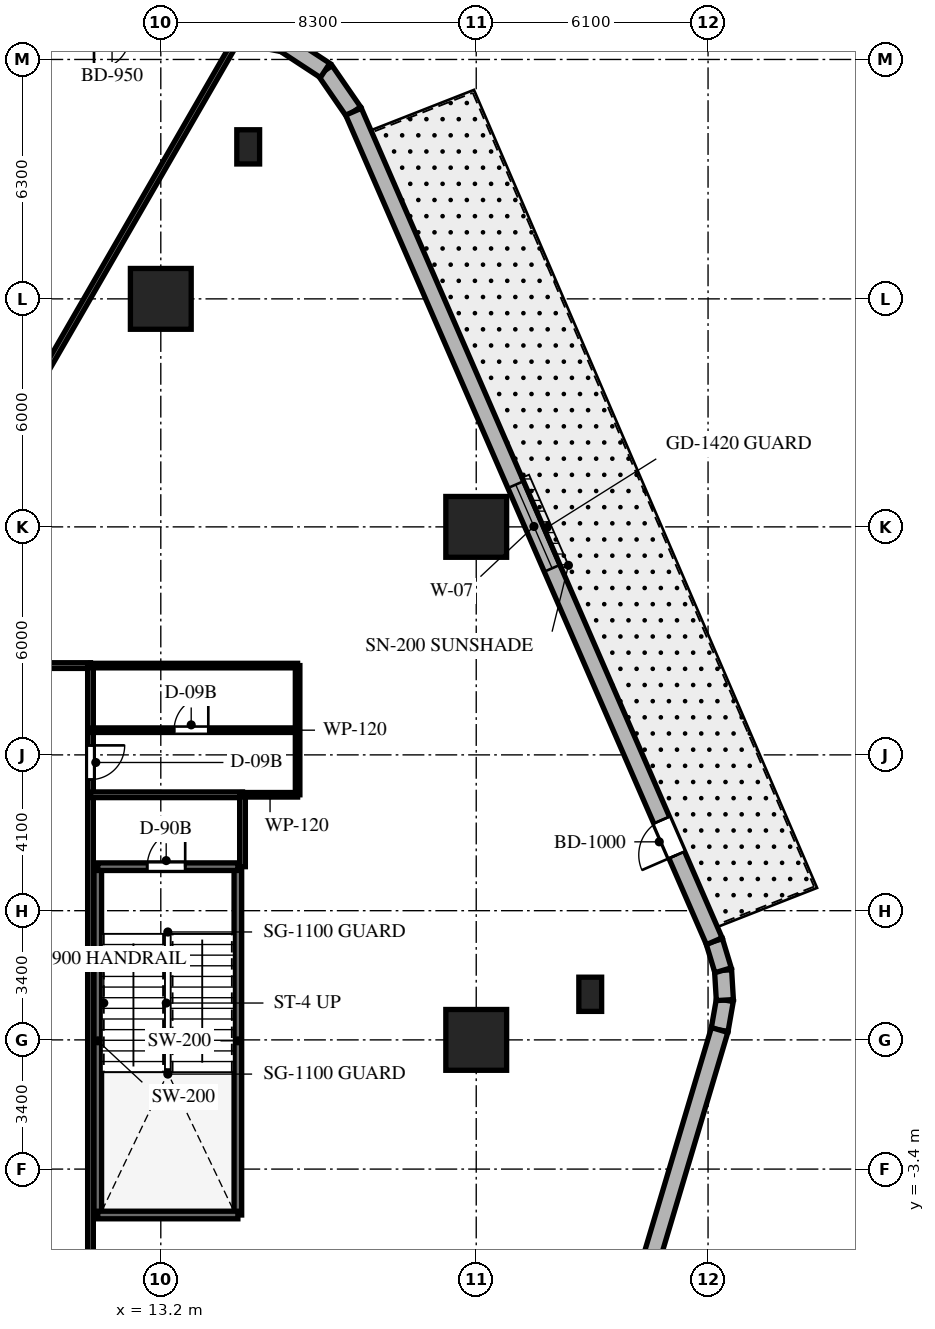
"""IFC4 building model, lengths in metres.
Left out: names, types, materials, properties, quantities, classifications, styles, units other than length and angle.
Written with IfcOpenShell. Run it as: python <this file> out.ifc"""

import sys

from ifc_helpers import new_model, si_unit, direction, frame, frame_2d, origin, origin_2d, place, context, subcontext, project, spatial, rectangle, extrude, element, fill, save


model = new_model("IFC4")
c1 = context("Model", 3, precision=1e-05, world=origin(), true_north=direction((0.0, 1.0)))
c2 = subcontext(c1, "Body", "Model", "MODEL_VIEW")
j1 = project(units=[si_unit("LENGTHUNIT", "METRE"), si_unit("PLANEANGLEUNIT", "RADIAN")], contexts=[c1])
p1 = place(None, origin())
s1 = spatial("IfcSite", under=j1, at=p1, CompositionType="ELEMENT")
p2 = place(p1, origin())
s2 = spatial("IfcBuilding", under=s1, at=p2, CompositionType="ELEMENT")
p3 = place(p2, frame((0.0, 0.0, 18.6)))
s3 = spatial("IfcBuildingStorey", under=s2, at=p3, CompositionType="ELEMENT", Elevation=18.6)
for number, where, z_axis, x_axis in (
    (1, (11.542, -4.608, 0.0), (0.0, 0.0, 1.0), (0.0, 1.0, 0.0)),
    (2, (15.228, -4.608, 0.0), (0.0, 0.0, 1.0), (0.0, 1.0, 0.0)),
):
    element("IfcWall", number, at=place(p3, frame(where, z_axis=z_axis, x_axis=x_axis)), inside=s3, PredefinedType="SHEAR", context=c2, shape_type="SweptSolid", body=[
        extrude(rectangle(XDim=9.166, YDim=0.2, at=frame_2d((4.583, 0.0))), origin(), (0.0, 0.0, 1.0), 4.8),
    ])
p4 = place(p3, frame((11.542, -4.608, 0.0), z_axis=(0.0, 0.0, 1.0), x_axis=(1.0, 0.0, 0.0)))
e3 = element("IfcWall", 3, at=p4, inside=s3, PredefinedType="SHEAR", context=c2, shape_type="SweptSolid", body=[
    extrude(rectangle(XDim=3.686, YDim=0.2, at=frame_2d((1.843, 0.0))), origin(), (0.0, 0.0, 1.0), 4.8),
])
p5 = place(p3, frame((11.542, 4.558, 0.0), z_axis=(0.0, 0.0, 1.0), x_axis=(1.0, 0.0, 0.0)))
e4 = element("IfcWall", 4, at=p5, inside=s3, PredefinedType="SHEAR", context=c2, shape_type="SweptSolid", body=[
    extrude(rectangle(XDim=3.686, YDim=0.2, at=frame_2d((1.843, 0.0))), origin(), (0.0, 0.0, 1.0), 4.8),
])
p6 = place(p5, frame((1.3, 0.0, 0.0)))
e5 = element("IfcOpeningElement", 5, at=p6, cuts=e4, PredefinedType="OPENING", context=c2, shape_type="SweptSolid", body=[
    extrude(rectangle(XDim=1.0, YDim=2.15, at=frame_2d((0.5, 1.075))), frame((0.0, 0.11, 0.0), z_axis=(0.0, -1.0, 0.0), x_axis=(1.0, 0.0, 0.0)), (0.0, 0.0, 1.0), 0.22),
])
for number, where, z_axis, x_axis in (
    (6, (21.5, 0.0, 0.0), (0.0, 0.0, 1.0), (1.0, 0.0, 0.0)),
    (7, (21.5, 13.5, 0.0), (0.0, 0.0, 1.0), (1.0, 0.0, 0.0)),
    (8, (13.2, 19.5, 0.0), (0.0, 0.0, 1.0), (1.0, 0.0, 0.0)),
):
    element("IfcColumn", number, at=place(p3, frame(where, z_axis=z_axis, x_axis=x_axis)), inside=s3, PredefinedType="COLUMN", context=c2, shape_type="SweptSolid", body=[
        extrude(rectangle(XDim=1.6, YDim=1.6, at=origin_2d()), origin(), (0.0, 0.0, 1.0), 4.8),
    ])
for number, where, z_axis, x_axis in (
    (9, (24.5, 1.2, 0.0), (0.0, 0.0, 1.0), (1.0, 0.0, 0.0)),
    (10, (15.5, 23.5, 0.0), (0.0, 0.0, 1.0), (1.0, 0.0, 0.0)),
):
    element("IfcColumn", number, at=place(p3, frame(where, z_axis=z_axis, x_axis=x_axis)), inside=s3, PredefinedType="PILASTER", context=c2, shape_type="SweptSolid", body=[
        extrude(rectangle(XDim=0.6, YDim=0.9, at=origin_2d()), origin(), (0.0, 0.0, 1.0), 4.8),
    ])
p7 = place(p3, frame((27.905, 0.26, 0.0), z_axis=(0.0, 0.0, 1.0), x_axis=(0.17266943956, 0.984979829561, 0.0)))
e11 = element("IfcWall", 11, at=p7, inside=s3, PredefinedType="SOLIDWALL", context=c2, shape_type="SweptSolid", body=[
    extrude(rectangle(XDim=0.799, YDim=0.45, at=frame_2d((0.399, 0.0))), origin(), (0.0, 0.0, 1.0), 4.48),
])
p8 = place(p3, frame((28.042, 1.047, 0.0), z_axis=(0.0, 0.0, 1.0), x_axis=(-0.059960394052, 0.998200756935, 0.0)))
e12 = element("IfcWall", 12, at=p8, inside=s3, PredefinedType="SOLIDWALL", context=c2, shape_type="SweptSolid", body=[
    extrude(rectangle(XDim=0.786, YDim=0.45, at=frame_2d((0.393, 0.0))), origin(), (0.0, 0.0, 1.0), 4.48),
])
p9 = place(p3, frame((27.995, 1.832, 0.0), z_axis=(0.0, 0.0, 1.0), x_axis=(-0.2894220622, 0.957201582694, 0.0)))
e13 = element("IfcWall", 13, at=p9, inside=s3, PredefinedType="SOLIDWALL", context=c2, shape_type="SweptSolid", body=[
    extrude(rectangle(XDim=0.799, YDim=0.45, at=frame_2d((0.399, 0.0))), origin(), (0.0, 0.0, 1.0), 4.48),
])
p10 = place(p3, frame((18.271, 24.426, 0.0), z_axis=(0.0, 0.0, 1.0), x_axis=(-0.567629051817, 0.823284434162, 0.0)))
e14 = element("IfcWall", 14, at=p10, inside=s3, PredefinedType="SOLIDWALL", context=c2, shape_type="SweptSolid", body=[
    extrude(rectangle(XDim=1.318, YDim=0.45, at=frame_2d((0.659, 0.0))), origin(), (0.0, 0.0, 1.0), 4.48),
])
p11 = place(p3, frame((17.523, 25.511, 0.0), z_axis=(0.0, 0.0, 1.0), x_axis=(-0.83622878949, 0.548380717776, 0.0)))
e15 = element("IfcWall", 15, at=p11, inside=s3, PredefinedType="SOLIDWALL", context=c2, shape_type="SweptSolid", body=[
    extrude(rectangle(XDim=1.296, YDim=0.45, at=frame_2d((0.648, 0.0))), origin(), (0.0, 0.0, 1.0), 4.48),
])
p12 = place(p3, frame((20.651, -24.042, 0.0), z_axis=(0.0, 0.0, 1.0), x_axis=(0.286003469805, 0.958228581947, 0.0)))
e16 = element("IfcWall", 16, at=p12, inside=s3, PredefinedType="SOLIDWALL", context=c2, shape_type="SweptSolid", body=[
    extrude(rectangle(XDim=25.362, YDim=0.45, at=frame_2d((12.681, 0.0))), origin(), (0.0, 0.0, 1.0), 4.48),
])
p13 = place(p12, frame((11.481, 0.0, 0.85)))
e17 = element("IfcOpeningElement", 17, at=p13, cuts=e16, PredefinedType="OPENING", context=c2, shape_type="SweptSolid", body=[
    extrude(rectangle(XDim=2.4, YDim=2.4, at=frame_2d((1.2, 1.2))), frame((0.0, 0.235, 0.0), z_axis=(0.0, -1.0, 0.0), x_axis=(1.0, 0.0, 0.0)), (0.0, 0.0, 1.0), 0.47),
])
p14 = place(p3, frame((27.764, 2.596, 0.0), z_axis=(0.0, 0.0, 1.0), x_axis=(-0.398798114842, 0.917038747054, 0.0)))
e18 = element("IfcWall", 18, at=p14, inside=s3, PredefinedType="SOLIDWALL", context=c2, shape_type="SweptSolid", body=[
    extrude(rectangle(XDim=23.804, YDim=0.45, at=frame_2d((11.902, 0.0))), origin(), (0.0, 0.0, 1.0), 4.48),
])
p15 = place(p14, frame((2.476, 0.0, 0.0)))
e19 = element("IfcOpeningElement", 19, at=p15, cuts=e18, PredefinedType="OPENING", context=c2, shape_type="SweptSolid", body=[
    extrude(rectangle(XDim=1.0, YDim=2.15, at=frame_2d((0.5, 1.075))), frame((0.0, 0.235, 0.0), z_axis=(0.0, -1.0, 0.0), x_axis=(1.0, 0.0, 0.0)), (0.0, 0.0, 1.0), 0.47),
])
p16 = place(p14, frame((10.702, 0.0, 0.85)))
e20 = element("IfcOpeningElement", 20, at=p16, cuts=e18, PredefinedType="OPENING", context=c2, shape_type="SweptSolid", body=[
    extrude(rectangle(XDim=2.4, YDim=2.4, at=frame_2d((1.2, 1.2))), frame((0.0, 0.235, 0.0), z_axis=(0.0, -1.0, 0.0), x_axis=(1.0, 0.0, 0.0)), (0.0, 0.0, 1.0), 0.47),
])
p17 = place(p3, frame((-11.35, 9.85, 0.0), z_axis=(0.0, 0.0, 1.0), x_axis=(1.0, 0.0, 0.0)))
e21 = element("IfcWall", 21, at=p17, inside=s3, PredefinedType="PARTITIONING", context=c2, shape_type="SweptSolid", body=[
    extrude(rectangle(XDim=22.7, YDim=0.15, at=frame_2d((11.35, 0.0))), origin(), (0.0, 0.0, 1.0), 3.522),
])
p18 = place(p17, frame((19.249, 0.0, 0.0)))
e22 = element("IfcOpeningElement", 22, at=p18, cuts=e21, PredefinedType="OPENING", context=c2, shape_type="SweptSolid", body=[
    extrude(rectangle(XDim=1.0, YDim=2.03, at=frame_2d((0.5, 1.015))), frame((0.0, 0.085, 0.0), z_axis=(0.0, -1.0, 0.0), x_axis=(1.0, 0.0, 0.0)), (0.0, 0.0, 1.0), 0.17),
])
p19 = place(p3, frame((11.35, 9.85, 0.0), z_axis=(0.0, 0.0, 1.0), x_axis=(0.0, -1.0, 0.0)))
e23 = element("IfcWall", 23, at=p19, inside=s3, PredefinedType="PARTITIONING", context=c2, shape_type="SweptSolid", body=[
    extrude(rectangle(XDim=19.7, YDim=0.15, at=frame_2d((9.85, 0.0))), origin(), (0.0, 0.0, 1.0), 3.522),
])
p20 = place(p19, frame((2.1, 0.0, 0.0)))
e24 = element("IfcOpeningElement", 24, at=p20, cuts=e23, PredefinedType="OPENING", context=c2, shape_type="SweptSolid", body=[
    extrude(rectangle(XDim=0.9, YDim=2.03, at=frame_2d((0.45, 1.015))), frame((0.0, 0.085, 0.0), z_axis=(0.0, -1.0, 0.0), x_axis=(1.0, 0.0, 0.0)), (0.0, 0.0, 1.0), 0.17),
])
p21 = place(p3, frame((11.35, 6.45, 0.0), z_axis=(0.0, 0.0, 1.0), x_axis=(1.0, 0.0, 0.0)))
e25 = element("IfcWall", 25, at=p21, inside=s3, PredefinedType="PARTITIONING", context=c2, shape_type="SweptSolid", body=[
    extrude(rectangle(XDim=4.0, YDim=0.15, at=frame_2d((2.0, 0.0))), origin(), (0.0, 0.0, 1.0), 4.48),
])
p22 = place(p3, frame((15.35, 4.558, 0.0), z_axis=(0.0, 0.0, 1.0), x_axis=(0.0, 1.0, 0.0)))
e26 = element("IfcWall", 26, at=p22, inside=s3, PredefinedType="PARTITIONING", context=c2, shape_type="SweptSolid", body=[
    extrude(rectangle(XDim=1.892, YDim=0.15, at=frame_2d((0.946, 0.0))), origin(), (0.0, 0.0, 1.0), 4.48),
])
p23 = place(p3, frame((15.35, 6.45, 0.0), z_axis=(0.0, 0.0, 1.0), x_axis=(1.0, 0.0, 0.0)))
e27 = element("IfcWall", 27, at=p23, inside=s3, PredefinedType="PARTITIONING", context=c2, shape_type="SweptSolid", body=[
    extrude(rectangle(XDim=1.45, YDim=0.12, at=frame_2d((0.725, 0.0))), origin(), (0.0, 0.0, 1.0), 4.48),
])
p24 = place(p3, frame((16.8, 6.45, 0.0), z_axis=(0.0, 0.0, 1.0), x_axis=(0.0, 1.0, 0.0)))
e28 = element("IfcWall", 28, at=p24, inside=s3, PredefinedType="PARTITIONING", context=c2, shape_type="SweptSolid", body=[
    extrude(rectangle(XDim=3.4, YDim=0.12, at=frame_2d((1.7, 0.0))), origin(), (0.0, 0.0, 1.0), 4.48),
])
p25 = place(p3, frame((11.35, 9.85, 0.0), z_axis=(0.0, 0.0, 1.0), x_axis=(1.0, 0.0, 0.0)))
e29 = element("IfcWall", 29, at=p25, inside=s3, PredefinedType="PARTITIONING", context=c2, shape_type="SweptSolid", body=[
    extrude(rectangle(XDim=5.45, YDim=0.12, at=frame_2d((2.725, 0.0))), origin(), (0.0, 0.0, 1.0), 3.614),
])
p26 = place(p3, frame((11.35, 8.15, 0.0), z_axis=(0.0, 0.0, 1.0), x_axis=(1.0, 0.0, 0.0)))
e30 = element("IfcWall", 30, at=p26, inside=s3, PredefinedType="PARTITIONING", context=c2, shape_type="SweptSolid", body=[
    extrude(rectangle(XDim=5.45, YDim=0.12, at=frame_2d((2.725, 0.0))), origin(), (0.0, 0.0, 1.0), 4.48),
])
p27 = place(p26, frame((2.2, 0.0, 0.0)))
e31 = element("IfcOpeningElement", 31, at=p27, cuts=e30, PredefinedType="OPENING", context=c2, shape_type="SweptSolid", body=[
    extrude(rectangle(XDim=0.9, YDim=2.03, at=frame_2d((0.45, 1.015))), frame((0.0, 0.07, 0.0), z_axis=(0.0, -1.0, 0.0), x_axis=(1.0, 0.0, 0.0)), (0.0, 0.0, 1.0), 0.14),
])
p28 = place(p3, frame((5.687, 9.85, 0.0), z_axis=(0.0, 0.0, 1.0), x_axis=(0.499994975061, 0.866028304915, 0.0)))
e32 = element("IfcWall", 32, at=p28, inside=s3, PredefinedType="PARTITIONING", context=c2, shape_type="SweptSolid", body=[
    extrude(rectangle(XDim=18.999, YDim=0.15, at=frame_2d((9.5, 0.0))), origin(), (0.0, 0.0, 1.0), 3.614),
])
p29 = place(p15, origin())
e33 = element("IfcDoor", 33, at=p29, inside=s3, OperationType="SINGLE_SWING_LEFT", PredefinedType="DOOR", context=c2, shape_type="SweptSolid", body=[
    extrude(rectangle(XDim=1.0, YDim=2.15, at=frame_2d((0.5, 1.075))), frame((0.0, 0.025, 0.0), z_axis=(0.0, -1.0, 0.0), x_axis=(1.0, 0.0, 0.0)), (0.0, 0.0, 1.0), 0.05),
])
fill(e19, e33)
p30 = place(p16, origin())
e34 = element("IfcWindow", 34, at=p30, inside=s3, PartitioningType="SINGLE_PANEL", PredefinedType="WINDOW", context=c2, shape_type="SweptSolid", body=[
    extrude(rectangle(XDim=2.4, YDim=2.4, at=frame_2d((1.2, 1.2))), frame((0.0, 0.03, 0.0), z_axis=(0.0, -1.0, 0.0), x_axis=(1.0, 0.0, 0.0)), (0.0, 0.0, 1.0), 0.06),
])
fill(e20, e34)
p31 = place(p6, origin())
e35 = element("IfcDoor", 35, at=p31, inside=s3, OperationType="SINGLE_SWING_RIGHT", PredefinedType="DOOR", context=c2, shape_type="SweptSolid", body=[
    extrude(rectangle(XDim=1.0, YDim=2.15, at=frame_2d((0.5, 1.075))), frame((0.0, 0.025, 0.0), z_axis=(0.0, -1.0, 0.0), x_axis=(1.0, 0.0, 0.0)), (0.0, 0.0, 1.0), 0.05),
])
fill(e5, e35)
p32 = place(p20, origin())
e36 = element("IfcDoor", 36, at=p32, inside=s3, OperationType="SINGLE_SWING_LEFT", PredefinedType="DOOR", context=c2, shape_type="SweptSolid", body=[
    extrude(rectangle(XDim=0.9, YDim=2.03, at=frame_2d((0.45, 1.015))), frame((0.0, 0.025, 0.0), z_axis=(0.0, -1.0, 0.0), x_axis=(1.0, 0.0, 0.0)), (0.0, 0.0, 1.0), 0.05),
])
fill(e24, e36)
p33 = place(p27, origin())
e37 = element("IfcDoor", 37, at=p33, inside=s3, OperationType="SINGLE_SWING_RIGHT", PredefinedType="DOOR", context=c2, shape_type="SweptSolid", body=[
    extrude(rectangle(XDim=0.9, YDim=2.03, at=frame_2d((0.45, 1.015))), frame((0.0, 0.025, 0.0), z_axis=(0.0, -1.0, 0.0), x_axis=(1.0, 0.0, 0.0)), (0.0, 0.0, 1.0), 0.05),
])
fill(e31, e37)
save(model, sys.argv[1])
